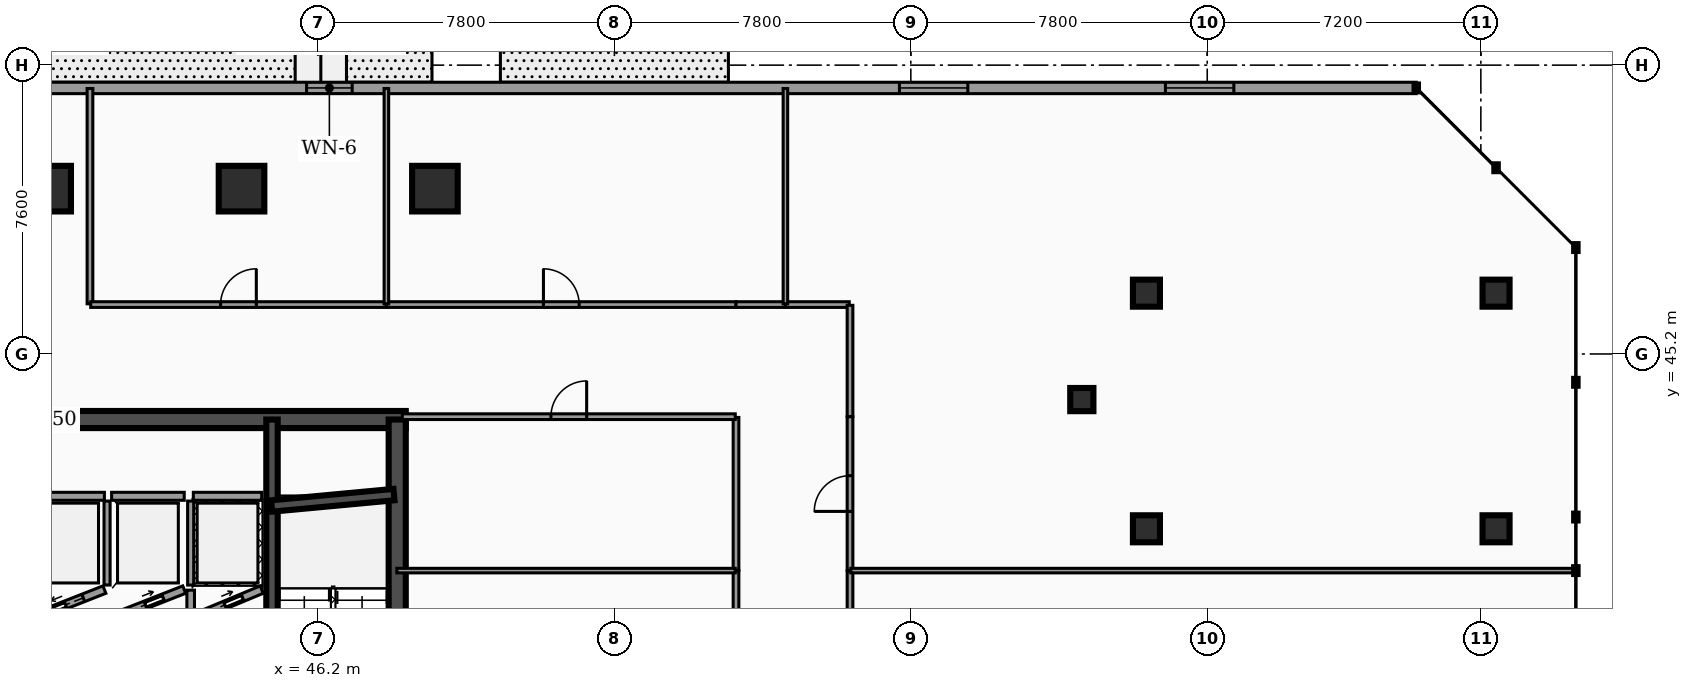
"""IFC4 building model, lengths in metres.
Left out: names, types, materials, properties, quantities, classifications, styles, units other than length and angle.
Written with IfcOpenShell. Run it as: python <this file> out.ifc"""

import sys

from ifc_helpers import new_model, si_unit, direction, frame, frame_2d, origin, origin_2d, place, context, subcontext, project, spatial, rectangle, hollow_rectangle, hollow_circle, extrude, element, fill, save


model = new_model("IFC4")
c1 = context("Model", 3, precision=1e-05, world=origin(), true_north=direction((0.0, 1.0)))
c2 = subcontext(c1, "Body", "Model", "MODEL_VIEW")
j1 = project(units=[si_unit("LENGTHUNIT", "METRE"), si_unit("PLANEANGLEUNIT", "RADIAN")], contexts=[c1])
p1 = place(None, origin())
s1 = spatial("IfcSite", under=j1, at=p1, CompositionType="ELEMENT")
p2 = place(p1, origin())
s2 = spatial("IfcBuilding", under=s1, at=p2, CompositionType="ELEMENT")
p3 = place(p2, origin())
s3 = spatial("IfcBuildingStorey", under=s2, at=p3, CompositionType="ELEMENT", Elevation=0.0)
p4 = place(p3, frame((28.4, 43.475, 0.0), z_axis=(0.0, 0.0, 1.0), x_axis=(1.0, 0.0, 0.0)))
e1 = element("IfcWall", 1, at=p4, inside=s3, PredefinedType="SHEAR", context=c2, shape_type="SweptSolid", body=[
    extrude(rectangle(XDim=20.11, YDim=0.45, at=frame_2d((10.055, 0.0))), origin(), (0.0, 0.0, 1.0), 4.82),
])
p5 = place(p3, frame((44.99, 33.225, 0.0), z_axis=(0.0, 0.0, 1.0), x_axis=(0.0, 1.0, 0.0)))
e2 = element("IfcWall", 2, at=p5, inside=s3, PredefinedType="SHEAR", context=c2, shape_type="SweptSolid", body=[
    extrude(rectangle(XDim=10.25, YDim=0.3, at=frame_2d((5.125, 0.0))), origin(), (0.0, 0.0, 1.0), 4.82),
])
p6 = place(p3, frame((48.285, 33.225, 0.0), z_axis=(0.0, 0.0, 1.0), x_axis=(0.0, 1.0, 0.0)))
e3 = element("IfcWall", 3, at=p6, inside=s3, PredefinedType="SHEAR", context=c2, shape_type="SweptSolid", body=[
    extrude(rectangle(XDim=10.25, YDim=0.45, at=frame_2d((5.125, 0.0))), origin(), (0.0, 0.0, 1.0), 4.82),
])
p7 = place(p3, frame((44.98, 41.2, 0.0), z_axis=(0.0, 0.0, 1.0), x_axis=(0.995686468965, 0.09278176286, 0.0)))
e4 = element("IfcWall", 4, at=p7, inside=s3, PredefinedType="SHEAR", context=c2, shape_type="SweptSolid", body=[
    extrude(rectangle(XDim=3.234, YDim=0.3, at=frame_2d((1.617, 0.0))), origin(), (0.0, 0.0, 1.0), 4.82),
])
for number, where, z_axis, x_axis in (
    (5, (49.277, 49.55, 0.0), (0.0, 0.0, 1.0), (1.0, 0.0, 0.0)),
    (6, (44.188, 49.55, 0.0), (0.0, 0.0, 1.0), (1.0, 0.0, 0.0)),
    (7, (39.1, 49.55, 0.0), (0.0, 0.0, 1.0), (1.0, 0.0, 0.0)),
):
    element("IfcColumn", number, at=place(p3, frame(where, z_axis=z_axis, x_axis=x_axis)), inside=s3, PredefinedType="COLUMN", context=c2, shape_type="SweptSolid", body=[
        extrude(hollow_rectangle(XDim=1.2, YDim=1.2, WallThickness=0.06, at=origin_2d()), origin(), (0.0, 0.0, 1.0), 4.82),
    ])
p8 = place(p3, frame((66.3, 44.0, 0.0), z_axis=(0.0, 0.0, 1.0), x_axis=(1.0, 0.0, 0.0)))
e8 = element("IfcColumn", 8, at=p8, inside=s3, PredefinedType="COLUMN", context=c2, shape_type="SweptSolid", body=[
    extrude(hollow_circle(Radius=0.305, WallThickness=0.025, at=origin_2d()), origin(), (0.0, 0.0, 1.0), 4.82),
])
for number, where, z_axis, x_axis in (
    (9, (77.2, 40.6, 0.0), (0.0, 0.0, 1.0), (1.0, 0.0, 0.0)),
    (10, (68.0, 40.6, 0.0), (0.0, 0.0, 1.0), (1.0, 0.0, 0.0)),
    (11, (77.2, 46.8, 0.0), (0.0, 0.0, 1.0), (1.0, 0.0, 0.0)),
    (12, (68.0, 46.8, 0.0), (0.0, 0.0, 1.0), (1.0, 0.0, 0.0)),
):
    element("IfcColumn", number, at=place(p3, frame(where, z_axis=z_axis, x_axis=x_axis)), inside=s3, PredefinedType="COLUMN", context=c2, shape_type="SweptSolid", body=[
        extrude(hollow_circle(Radius=0.355, WallThickness=0.03, at=origin_2d()), origin(), (0.0, 0.0, 1.0), 4.82),
    ])
p9 = place(p3, frame((1.7, 52.2, 0.0), z_axis=(0.0, 0.0, 1.0), x_axis=(1.0, 0.0, 0.0)))
e13 = element("IfcWall", 13, at=p9, inside=s3, PredefinedType="STANDARD", context=c2, shape_type="SweptSolid", body=[
    extrude(rectangle(XDim=73.4, YDim=0.3, at=frame_2d((36.7, 0.0))), origin(), (0.0, 0.0, 1.0), 4.205),
])
p10 = place(p9, frame((7.3, 0.0, 0.0)))
e14 = element("IfcOpeningElement", 14, at=p10, cuts=e13, PredefinedType="OPENING", context=c2, shape_type="SweptSolid", body=[
    extrude(rectangle(XDim=4.0, YDim=3.5, at=frame_2d((2.0, 1.75))), frame((0.0, 0.16, 0.0), z_axis=(0.0, -1.0, 0.0), x_axis=(1.0, 0.0, 0.0)), (0.0, 0.0, 1.0), 0.32),
])
p11 = place(p9, frame((31.45, 0.0, 0.0)))
e15 = element("IfcOpeningElement", 15, at=p11, cuts=e13, PredefinedType="OPENING", context=c2, shape_type="SweptSolid", body=[
    extrude(rectangle(XDim=2.4, YDim=2.6, at=frame_2d((1.2, 1.3))), frame((0.0, 0.16, 0.0), z_axis=(0.0, -1.0, 0.0), x_axis=(1.0, 0.0, 0.0)), (0.0, 0.0, 1.0), 0.32),
])
p12 = place(p9, frame((44.2, 0.0, 1.0)))
e16 = element("IfcOpeningElement", 16, at=p12, cuts=e13, PredefinedType="OPENING", context=c2, shape_type="SweptSolid", body=[
    extrude(rectangle(XDim=1.2, YDim=1.5, at=frame_2d((0.6, 0.75))), frame((0.0, 0.16, 0.0), z_axis=(0.0, -1.0, 0.0), x_axis=(1.0, 0.0, 0.0)), (0.0, 0.0, 1.0), 0.32),
])
p13 = place(p9, frame((11.9, 0.0, 0.95)))
e17 = element("IfcOpeningElement", 17, at=p13, cuts=e13, PredefinedType="OPENING", context=c2, shape_type="SweptSolid", body=[
    extrude(rectangle(XDim=1.8, YDim=2.1, at=frame_2d((0.9, 1.05))), frame((0.0, 0.16, 0.0), z_axis=(0.0, -1.0, 0.0), x_axis=(1.0, 0.0, 0.0)), (0.0, 0.0, 1.0), 0.32),
])
p14 = place(p9, frame((59.8, 0.0, 0.95)))
e18 = element("IfcOpeningElement", 18, at=p14, cuts=e13, PredefinedType="OPENING", context=c2, shape_type="SweptSolid", body=[
    extrude(rectangle(XDim=1.8, YDim=2.1, at=frame_2d((0.9, 1.05))), frame((0.0, 0.16, 0.0), z_axis=(0.0, -1.0, 0.0), x_axis=(1.0, 0.0, 0.0)), (0.0, 0.0, 1.0), 0.32),
])
p15 = place(p9, frame((66.8, 0.0, 0.95)))
e19 = element("IfcOpeningElement", 19, at=p15, cuts=e13, PredefinedType="OPENING", context=c2, shape_type="SweptSolid", body=[
    extrude(rectangle(XDim=1.8, YDim=2.1, at=frame_2d((0.9, 1.05))), frame((0.0, 0.16, 0.0), z_axis=(0.0, -1.0, 0.0), x_axis=(1.0, 0.0, 0.0)), (0.0, 0.0, 1.0), 0.32),
])
p16 = place(p3, frame((42.92, 38.25, 0.0), z_axis=(0.0, 0.0, 1.0), x_axis=(0.9230806271, 0.384606494839, 0.0)))
e20 = element("IfcWall", 20, at=p16, inside=s3, PredefinedType="SOLIDWALL", context=c2, shape_type="SweptSolid", body=[
    extrude(rectangle(XDim=1.95, YDim=0.21, at=frame_2d((0.975, 0.0))), origin(), (0.0, 0.0, 1.0), 3.792),
])
p17 = place(p16, frame((0.4, 0.0, 0.0)))
e21 = element("IfcOpeningElement", 21, at=p17, cuts=e20, PredefinedType="OPENING", context=c2, shape_type="SweptSolid", body=[
    extrude(rectangle(XDim=1.0, YDim=2.1, at=frame_2d((0.5, 1.05))), frame((0.0, 0.115, 0.0), z_axis=(0.0, -1.0, 0.0), x_axis=(1.0, 0.0, 0.0)), (0.0, 0.0, 1.0), 0.23),
])
p18 = place(p3, frame((42.92, 41.455, 0.0), z_axis=(0.0, 0.0, 1.0), x_axis=(1.0, 0.0, 0.0)))
e22 = element("IfcWall", 22, at=p18, inside=s3, PredefinedType="SOLIDWALL", context=c2, shape_type="SweptSolid", body=[
    extrude(rectangle(XDim=1.8, YDim=0.21, at=frame_2d((0.9, 0.0))), origin(), (0.0, 0.0, 1.0), 3.792),
])
p19 = place(p3, frame((42.85, 39.12, 0.0), z_axis=(0.0, 0.0, 1.0), x_axis=(0.0, 1.0, 0.0)))
e23 = element("IfcWall", 23, at=p19, inside=s3, PredefinedType="SOLIDWALL", context=c2, shape_type="SweptSolid", body=[
    extrude(rectangle(XDim=2.21, YDim=0.16, at=frame_2d((1.105, 0.0))), origin(), (0.0, 0.0, 1.0), 3.792),
])
p20 = place(p3, frame((38.67, 38.25, 0.0), z_axis=(0.0, 0.0, 1.0), x_axis=(0.930820886763, 0.3654756856, 0.0)))
e24 = element("IfcWall", 24, at=p20, inside=s3, PredefinedType="SOLIDWALL", context=c2, shape_type="SweptSolid", body=[
    extrude(rectangle(XDim=2.052, YDim=0.21, at=frame_2d((1.026, 0.0))), origin(), (0.0, 0.0, 1.0), 3.792),
])
p21 = place(p20, frame((0.455, 0.0, 0.0)))
e25 = element("IfcOpeningElement", 25, at=p21, cuts=e24, PredefinedType="OPENING", context=c2, shape_type="SweptSolid", body=[
    extrude(rectangle(XDim=1.0, YDim=2.1, at=frame_2d((0.5, 1.05))), frame((0.0, 0.115, 0.0), z_axis=(0.0, -1.0, 0.0), x_axis=(1.0, 0.0, 0.0)), (0.0, 0.0, 1.0), 0.23),
])
p22 = place(p3, frame((38.67, 41.455, 0.0), z_axis=(0.0, 0.0, 1.0), x_axis=(1.0, 0.0, 0.0)))
e26 = element("IfcWall", 26, at=p22, inside=s3, PredefinedType="SOLIDWALL", context=c2, shape_type="SweptSolid", body=[
    extrude(rectangle(XDim=1.91, YDim=0.21, at=frame_2d((0.955, 0.0))), origin(), (0.0, 0.0, 1.0), 3.792),
])
p23 = place(p3, frame((40.65, 39.12, 0.0), z_axis=(0.0, 0.0, 1.0), x_axis=(0.0, 1.0, 0.0)))
e27 = element("IfcWall", 27, at=p23, inside=s3, PredefinedType="SOLIDWALL", context=c2, shape_type="SweptSolid", body=[
    extrude(rectangle(XDim=2.21, YDim=0.16, at=frame_2d((1.105, 0.0))), origin(), (0.0, 0.0, 1.0), 3.792),
])
p24 = place(p3, frame((40.77, 38.25, 0.0), z_axis=(0.0, 0.0, 1.0), x_axis=(0.930804993012, 0.36551616241, 0.0)))
e28 = element("IfcWall", 28, at=p24, inside=s3, PredefinedType="SOLIDWALL", context=c2, shape_type="SweptSolid", body=[
    extrude(rectangle(XDim=2.052, YDim=0.21, at=frame_2d((1.026, 0.0))), origin(), (0.0, 0.0, 1.0), 3.792),
])
p25 = place(p24, frame((0.455, 0.0, 0.0)))
e29 = element("IfcOpeningElement", 29, at=p25, cuts=e28, PredefinedType="OPENING", context=c2, shape_type="SweptSolid", body=[
    extrude(rectangle(XDim=1.0, YDim=2.1, at=frame_2d((0.5, 1.05))), frame((0.0, 0.115, 0.0), z_axis=(0.0, -1.0, 0.0), x_axis=(1.0, 0.0, 0.0)), (0.0, 0.0, 1.0), 0.23),
])
p26 = place(p3, frame((40.77, 41.455, 0.0), z_axis=(0.0, 0.0, 1.0), x_axis=(1.0, 0.0, 0.0)))
e30 = element("IfcWall", 30, at=p26, inside=s3, PredefinedType="SOLIDWALL", context=c2, shape_type="SweptSolid", body=[
    extrude(rectangle(XDim=1.91, YDim=0.21, at=frame_2d((0.955, 0.0))), origin(), (0.0, 0.0, 1.0), 3.792),
])
p27 = place(p3, frame((42.85, 37.57, 0.0), z_axis=(0.0, 0.0, 1.0), x_axis=(0.0, 1.0, 0.0)))
e31 = element("IfcWall", 31, at=p27, inside=s3, PredefinedType="PARTITIONING", context=c2, shape_type="SweptSolid", body=[
    extrude(rectangle(XDim=1.415, YDim=0.2, at=frame_2d((0.708, 0.0))), origin(), (0.0, 0.0, 1.0), 3.777),
])
p28 = place(p3, frame((60.2, 30.17, 0.0), z_axis=(0.0, 0.0, 1.0), x_axis=(0.0, 1.0, 0.0)))
e32 = element("IfcWall", 32, at=p28, inside=s3, PredefinedType="PARTITIONING", context=c2, shape_type="SweptSolid", body=[
    extrude(rectangle(XDim=9.325, YDim=0.15, at=frame_2d((4.663, 0.0))), origin(), (0.0, 0.0, 1.0), 3.777),
])
p29 = place(p28, frame((6.593, 0.0, 0.0)))
e33 = element("IfcOpeningElement", 33, at=p29, cuts=e32, PredefinedType="OPENING", context=c2, shape_type="SweptSolid", body=[
    extrude(rectangle(XDim=0.94, YDim=2.05, at=frame_2d((0.47, 1.025))), frame((0.0, 0.085, 0.0), z_axis=(0.0, -1.0, 0.0), x_axis=(1.0, 0.0, 0.0)), (0.0, 0.0, 1.0), 0.17),
])
p30 = place(p3, frame((58.505, 46.5, 0.0), z_axis=(0.0, 0.0, 1.0), x_axis=(1.0, 0.0, 0.0)))
e34 = element("IfcWall", 34, at=p30, inside=s3, PredefinedType="PARTITIONING", context=c2, shape_type="SweptSolid", body=[
    extrude(rectangle(XDim=1.675, YDim=0.15, at=frame_2d((0.837, 0.0))), origin(), (0.0, 0.0, 1.0), 3.777),
])
p31 = place(p3, frame((60.2, 43.55, 0.0), z_axis=(0.0, 0.0, 1.0), x_axis=(0.0, 1.0, 0.0)))
e35 = element("IfcWall", 35, at=p31, inside=s3, PredefinedType="PARTITIONING", context=c2, shape_type="SweptSolid", body=[
    extrude(rectangle(XDim=2.93, YDim=0.15, at=frame_2d((1.465, 0.0))), origin(), (0.0, 0.0, 1.0), 3.777),
])
p32 = place(p3, frame((60.2, 39.505, 0.0), z_axis=(0.0, 0.0, 1.0), x_axis=(0.0, 1.0, 0.0)))
e36 = element("IfcWall", 36, at=p32, inside=s3, PredefinedType="PARTITIONING", context=c2, shape_type="SweptSolid", body=[
    extrude(rectangle(XDim=4.045, YDim=0.15, at=frame_2d((2.022, 0.0))), origin(), (0.0, 0.0, 1.0), 3.777),
])
p33 = place(p32, frame((1.552, 0.0, 0.0)))
e37 = element("IfcOpeningElement", 37, at=p33, cuts=e36, PredefinedType="OPENING", context=c2, shape_type="SweptSolid", body=[
    extrude(rectangle(XDim=0.94, YDim=2.05, at=frame_2d((0.47, 1.025))), frame((0.0, 0.085, 0.0), z_axis=(0.0, -1.0, 0.0), x_axis=(1.0, 0.0, 0.0)), (0.0, 0.0, 1.0), 0.17),
])
p34 = place(p3, frame((40.2, 46.52, 0.0), z_axis=(0.0, 0.0, 1.0), x_axis=(0.0, 1.0, 0.0)))
e38 = element("IfcWall", 38, at=p34, inside=s3, PredefinedType="PARTITIONING", context=c2, shape_type="SweptSolid", body=[
    extrude(rectangle(XDim=5.665, YDim=0.15, at=frame_2d((2.833, 0.0))), origin(), (0.0, 0.0, 1.0), 3.777),
])
p35 = place(p3, frame((40.22, 46.5, 0.0), z_axis=(0.0, 0.0, 1.0), x_axis=(1.0, 0.0, 0.0)))
e39 = element("IfcWall", 39, at=p35, inside=s3, PredefinedType="PARTITIONING", context=c2, shape_type="SweptSolid", body=[
    extrude(rectangle(XDim=7.775, YDim=0.15, at=frame_2d((3.888, 0.0))), origin(), (0.0, 0.0, 1.0), 3.777),
])
p36 = place(p35, frame((3.417, 0.0, 0.0)))
e40 = element("IfcOpeningElement", 40, at=p36, cuts=e39, PredefinedType="OPENING", context=c2, shape_type="SweptSolid", body=[
    extrude(rectangle(XDim=0.94, YDim=2.05, at=frame_2d((0.47, 1.025))), frame((0.0, 0.085, 0.0), z_axis=(0.0, -1.0, 0.0), x_axis=(1.0, 0.0, 0.0)), (0.0, 0.0, 1.0), 0.17),
])
p37 = place(p3, frame((48.005, 46.5, 0.0), z_axis=(0.0, 0.0, 1.0), x_axis=(1.0, 0.0, 0.0)))
e41 = element("IfcWall", 41, at=p37, inside=s3, PredefinedType="PARTITIONING", context=c2, shape_type="SweptSolid", body=[
    extrude(rectangle(XDim=9.195, YDim=0.15, at=frame_2d((4.598, 0.0))), origin(), (0.0, 0.0, 1.0), 3.777),
])
p38 = place(p37, frame((4.127, 0.0, 0.0)))
e42 = element("IfcOpeningElement", 42, at=p38, cuts=e41, PredefinedType="OPENING", context=c2, shape_type="SweptSolid", body=[
    extrude(rectangle(XDim=0.94, YDim=2.05, at=frame_2d((0.47, 1.025))), frame((0.0, 0.085, 0.0), z_axis=(0.0, -1.0, 0.0), x_axis=(1.0, 0.0, 0.0)), (0.0, 0.0, 1.0), 0.17),
])
p39 = place(p3, frame((57.2, 46.5, 0.0), z_axis=(0.0, 0.0, 1.0), x_axis=(1.0, 0.0, 0.0)))
e43 = element("IfcWall", 43, at=p39, inside=s3, PredefinedType="PARTITIONING", context=c2, shape_type="SweptSolid", body=[
    extrude(rectangle(XDim=1.295, YDim=0.15, at=frame_2d((0.647, 0.0))), origin(), (0.0, 0.0, 1.0), 3.777),
])
p40 = place(p3, frame((57.2, 30.17, 0.0), z_axis=(0.0, 0.0, 1.0), x_axis=(0.0, 1.0, 0.0)))
e44 = element("IfcWall", 44, at=p40, inside=s3, PredefinedType="PARTITIONING", context=c2, shape_type="SweptSolid", body=[
    extrude(rectangle(XDim=9.325, YDim=0.15, at=frame_2d((4.663, 0.0))), origin(), (0.0, 0.0, 1.0), 3.777),
])
p41 = place(p40, frame((4.192, 0.0, 0.0)))
e45 = element("IfcOpeningElement", 45, at=p41, cuts=e44, PredefinedType="OPENING", context=c2, shape_type="SweptSolid", body=[
    extrude(rectangle(XDim=0.94, YDim=2.05, at=frame_2d((0.47, 1.025))), frame((0.0, 0.085, 0.0), z_axis=(0.0, -1.0, 0.0), x_axis=(1.0, 0.0, 0.0)), (0.0, 0.0, 1.0), 0.17),
])
p42 = place(p3, frame((57.2, 39.505, 0.0), z_axis=(0.0, 0.0, 1.0), x_axis=(0.0, 1.0, 0.0)))
e46 = element("IfcWall", 46, at=p42, inside=s3, PredefinedType="PARTITIONING", context=c2, shape_type="SweptSolid", body=[
    extrude(rectangle(XDim=4.025, YDim=0.15, at=frame_2d((2.013, 0.0))), origin(), (0.0, 0.0, 1.0), 3.777),
])
p43 = place(p3, frame((48.42, 43.55, 0.0), z_axis=(0.0, 0.0, 1.0), x_axis=(1.0, 0.0, 0.0)))
e47 = element("IfcWall", 47, at=p43, inside=s3, PredefinedType="PARTITIONING", context=c2, shape_type="SweptSolid", body=[
    extrude(rectangle(XDim=8.76, YDim=0.15, at=frame_2d((4.38, 0.0))), origin(), (0.0, 0.0, 1.0), 3.777),
])
p44 = place(p43, frame((3.91, 0.0, 0.0)))
e48 = element("IfcOpeningElement", 48, at=p44, cuts=e47, PredefinedType="OPENING", context=c2, shape_type="SweptSolid", body=[
    extrude(rectangle(XDim=0.94, YDim=2.05, at=frame_2d((0.47, 1.025))), frame((0.0, 0.085, 0.0), z_axis=(0.0, -1.0, 0.0), x_axis=(1.0, 0.0, 0.0)), (0.0, 0.0, 1.0), 0.17),
])
p45 = place(p3, frame((60.22, 39.5, 0.0), z_axis=(0.0, 0.0, 1.0), x_axis=(1.0, 0.0, 0.0)))
e49 = element("IfcWall", 49, at=p45, inside=s3, PredefinedType="PARTITIONING", context=c2, shape_type="SweptSolid", body=[
    extrude(rectangle(XDim=19.065, YDim=0.12, at=frame_2d((9.532, 0.0))), origin(), (0.0, 0.0, 1.0), 3.777),
])
for number, where, z_axis, x_axis in (
    (50, (58.5, 46.52, 0.0), (0.0, 0.0, 1.0), (0.0, 1.0, 0.0)),
    (51, (48.0, 46.52, 0.0), (0.0, 0.0, 1.0), (0.0, 1.0, 0.0)),
):
    element("IfcWall", number, at=place(p3, frame(where, z_axis=z_axis, x_axis=x_axis)), inside=s3, PredefinedType="PARTITIONING", context=c2, shape_type="SweptSolid", body=[
        extrude(rectangle(XDim=5.665, YDim=0.12, at=frame_2d((2.833, 0.0))), origin(), (0.0, 0.0, 1.0), 3.777),
    ])
p46 = place(p3, frame((48.275, 39.5, 0.0), z_axis=(0.0, 0.0, 1.0), x_axis=(1.0, 0.0, 0.0)))
e52 = element("IfcWall", 52, at=p46, inside=s3, PredefinedType="PARTITIONING", context=c2, shape_type="SweptSolid", body=[
    extrude(rectangle(XDim=8.905, YDim=0.12, at=frame_2d((4.453, 0.0))), origin(), (0.0, 0.0, 1.0), 3.777),
])
p47 = place(p12, origin())
e53 = element("IfcWindow", 53, at=p47, inside=s3, PartitioningType="SINGLE_PANEL", PredefinedType="WINDOW", context=c2, shape_type="SweptSolid", body=[
    extrude(rectangle(XDim=1.2, YDim=1.5, at=frame_2d((0.6, 0.75))), frame((0.0, 0.03, 0.0), z_axis=(0.0, -1.0, 0.0), x_axis=(1.0, 0.0, 0.0)), (0.0, 0.0, 1.0), 0.06),
])
fill(e16, e53)
p48 = place(p14, origin())
e54 = element("IfcWindow", 54, at=p48, inside=s3, PartitioningType="SINGLE_PANEL", PredefinedType="WINDOW", context=c2, shape_type="SweptSolid", body=[
    extrude(rectangle(XDim=1.8, YDim=2.1, at=frame_2d((0.9, 1.05))), frame((0.0, 0.03, 0.0), z_axis=(0.0, -1.0, 0.0), x_axis=(1.0, 0.0, 0.0)), (0.0, 0.0, 1.0), 0.06),
])
fill(e18, e54)
p49 = place(p15, origin())
e55 = element("IfcWindow", 55, at=p49, inside=s3, PartitioningType="SINGLE_PANEL", PredefinedType="WINDOW", context=c2, shape_type="SweptSolid", body=[
    extrude(rectangle(XDim=1.8, YDim=2.1, at=frame_2d((0.9, 1.05))), frame((0.0, 0.03, 0.0), z_axis=(0.0, -1.0, 0.0), x_axis=(1.0, 0.0, 0.0)), (0.0, 0.0, 1.0), 0.06),
])
fill(e19, e55)
p50 = place(p17, origin())
e56 = element("IfcDoor", 56, at=p50, inside=s3, OperationType="SLIDING_TO_RIGHT", PredefinedType="DOOR", context=c2, shape_type="SweptSolid", body=[
    extrude(rectangle(XDim=1.0, YDim=2.1, at=frame_2d((0.5, 1.05))), frame((0.0, 0.025, 0.0), z_axis=(0.0, -1.0, 0.0), x_axis=(1.0, 0.0, 0.0)), (0.0, 0.0, 1.0), 0.05),
])
fill(e21, e56)
p51 = place(p21, origin())
e57 = element("IfcDoor", 57, at=p51, inside=s3, OperationType="SLIDING_TO_LEFT", PredefinedType="DOOR", context=c2, shape_type="SweptSolid", body=[
    extrude(rectangle(XDim=1.0, YDim=2.1, at=frame_2d((0.5, 1.05))), frame((0.0, 0.025, 0.0), z_axis=(0.0, -1.0, 0.0), x_axis=(1.0, 0.0, 0.0)), (0.0, 0.0, 1.0), 0.05),
])
fill(e25, e57)
p52 = place(p25, origin())
e58 = element("IfcDoor", 58, at=p52, inside=s3, OperationType="SLIDING_TO_RIGHT", PredefinedType="DOOR", context=c2, shape_type="SweptSolid", body=[
    extrude(rectangle(XDim=1.0, YDim=2.1, at=frame_2d((0.5, 1.05))), frame((0.0, 0.025, 0.0), z_axis=(0.0, -1.0, 0.0), x_axis=(1.0, 0.0, 0.0)), (0.0, 0.0, 1.0), 0.05),
])
fill(e29, e58)
p53 = place(p33, origin())
e59 = element("IfcDoor", 59, at=p53, inside=s3, OperationType="SINGLE_SWING_LEFT", PredefinedType="DOOR", context=c2, shape_type="SweptSolid", body=[
    extrude(rectangle(XDim=0.94, YDim=2.05, at=frame_2d((0.47, 1.025))), frame((0.0, 0.025, 0.0), z_axis=(0.0, -1.0, 0.0), x_axis=(1.0, 0.0, 0.0)), (0.0, 0.0, 1.0), 0.05),
])
fill(e37, e59)
p54 = place(p36, origin())
e60 = element("IfcDoor", 60, at=p54, inside=s3, OperationType="SINGLE_SWING_RIGHT", PredefinedType="DOOR", context=c2, shape_type="SweptSolid", body=[
    extrude(rectangle(XDim=0.94, YDim=2.05, at=frame_2d((0.47, 1.025))), frame((0.0, 0.025, 0.0), z_axis=(0.0, -1.0, 0.0), x_axis=(1.0, 0.0, 0.0)), (0.0, 0.0, 1.0), 0.05),
])
fill(e40, e60)
p55 = place(p38, origin())
e61 = element("IfcDoor", 61, at=p55, inside=s3, OperationType="SINGLE_SWING_LEFT", PredefinedType="DOOR", context=c2, shape_type="SweptSolid", body=[
    extrude(rectangle(XDim=0.94, YDim=2.05, at=frame_2d((0.47, 1.025))), frame((0.0, 0.025, 0.0), z_axis=(0.0, -1.0, 0.0), x_axis=(1.0, 0.0, 0.0)), (0.0, 0.0, 1.0), 0.05),
])
fill(e42, e61)
p56 = place(p44, origin())
e62 = element("IfcDoor", 62, at=p56, inside=s3, OperationType="SINGLE_SWING_RIGHT", PredefinedType="DOOR", context=c2, shape_type="SweptSolid", body=[
    extrude(rectangle(XDim=0.94, YDim=2.05, at=frame_2d((0.47, 1.025))), frame((0.0, 0.025, 0.0), z_axis=(0.0, -1.0, 0.0), x_axis=(1.0, 0.0, 0.0)), (0.0, 0.0, 1.0), 0.05),
])
fill(e48, e62)
save(model, sys.argv[1])
